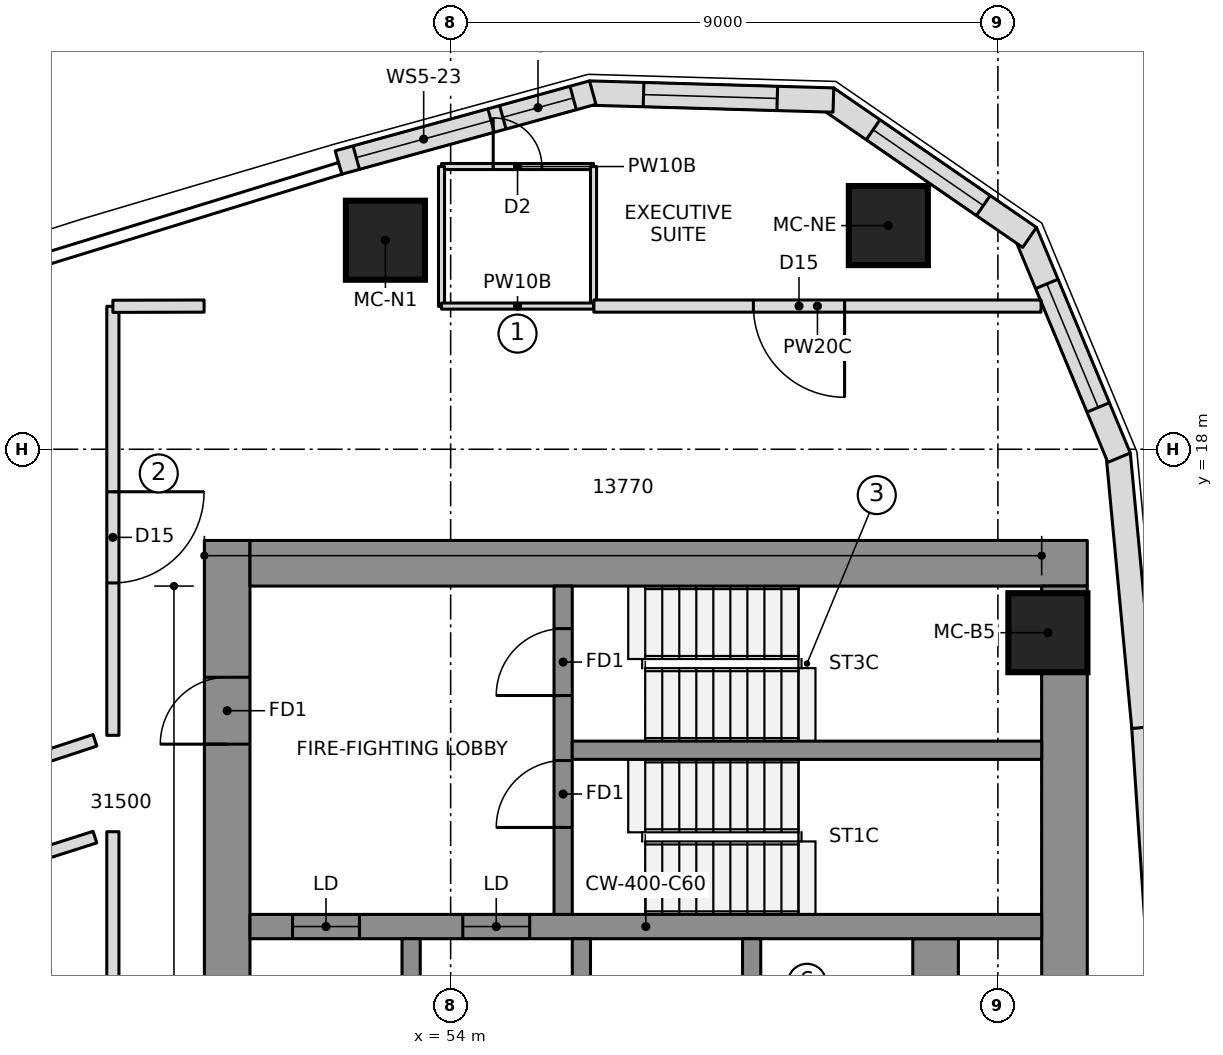
"""IFC4 building model, lengths in metres.
Left out: names, types, materials, properties, quantities, classifications, styles, units other than length and angle.
Written with IfcOpenShell. Run it as: python <this file> out.ifc"""

import sys

from ifc_helpers import new_model, si_unit, direction, frame, frame_2d, origin, origin_2d, place, context, subcontext, project, spatial, polyline, rectangle, outline, extrude, element, fill, save


model = new_model("IFC4")
c1 = context("Model", 3, precision=1e-05, world=origin(), true_north=direction((0.0, 1.0)))
c2 = subcontext(c1, "Body", "Model", "MODEL_VIEW")
j1 = project(units=[si_unit("LENGTHUNIT", "METRE"), si_unit("PLANEANGLEUNIT", "RADIAN")], contexts=[c1])
p1 = place(None, origin())
s1 = spatial("IfcSite", under=j1, at=p1, CompositionType="ELEMENT")
p2 = place(p1, origin())
s2 = spatial("IfcBuilding", under=s1, at=p2, CompositionType="ELEMENT")
p3 = place(p2, frame((0.0, 0.0, 186.15)))
s3 = spatial("IfcBuildingStorey", under=s2, at=p3, CompositionType="ELEMENT", Elevation=186.15)
p4 = place(p3, frame((50.325, 6.65, 0.0), z_axis=(0.0, 0.0, 1.0), x_axis=(0.0, 1.0, 0.0)))
e1 = element("IfcWall", 1, at=p4, inside=s3, PredefinedType="SHEAR", context=c2, shape_type="SweptSolid", body=[
    extrude(rectangle(XDim=9.85, YDim=0.75, at=frame_2d((4.925, 0.0))), origin(), (0.0, 0.0, 1.0), 3.55),
])
p5 = place(p4, frame((6.5, 0.0, 0.0)))
e2 = element("IfcOpeningElement", 2, at=p5, cuts=e1, PredefinedType="OPENING", context=c2, shape_type="SweptSolid", body=[
    extrude(rectangle(XDim=1.1, YDim=2.1, at=frame_2d((0.55, 1.05))), frame((0.0, 0.385, 0.0), z_axis=(0.0, -1.0, 0.0), x_axis=(1.0, 0.0, 0.0)), (0.0, 0.0, 1.0), 0.77),
])
p6 = place(p3, frame((50.7, 16.125, 0.0), z_axis=(0.0, 0.0, 1.0), x_axis=(1.0, 0.0, 0.0)))
e3 = element("IfcWall", 3, at=p6, inside=s3, PredefinedType="SHEAR", context=c2, shape_type="SweptSolid", body=[
    extrude(rectangle(XDim=13.77, YDim=0.75, at=frame_2d((6.885, 0.0))), origin(), (0.0, 0.0, 1.0), 3.55),
])
p7 = place(p3, frame((64.095, 8.099, 0.0), z_axis=(0.0, 0.0, 1.0), x_axis=(0.0, 1.0, 0.0)))
e4 = element("IfcWall", 4, at=p7, inside=s3, PredefinedType="SHEAR", context=c2, shape_type="SweptSolid", body=[
    extrude(rectangle(XDim=7.651, YDim=0.75, at=frame_2d((3.825, 0.0))), origin(), (0.0, 0.0, 1.0), 3.55),
])
p8 = place(p3, frame((61.975, -9.95, 0.0), z_axis=(0.0, 0.0, 1.0), x_axis=(0.0, 1.0, 0.0)))
e5 = element("IfcWall", 5, at=p8, inside=s3, PredefinedType="SHEAR", context=c2, shape_type="SweptSolid", body=[
    extrude(rectangle(XDim=19.9, YDim=0.75, at=frame_2d((9.95, 0.0))), origin(), (0.0, 0.0, 1.0), 3.55),
])
p9 = place(p3, frame((50.7, 10.15, 0.0), z_axis=(0.0, 0.0, 1.0), x_axis=(1.0, 0.0, 0.0)))
e6 = element("IfcWall", 6, at=p9, inside=s3, PredefinedType="SHEAR", context=c2, shape_type="SweptSolid", body=[
    extrude(rectangle(XDim=13.02, YDim=0.4, at=frame_2d((6.51, 0.0))), origin(), (0.0, 0.0, 1.0), 3.55),
])
p10 = place(p9, frame((0.7, 0.0, 0.0)))
e7 = element("IfcOpeningElement", 7, at=p10, cuts=e6, PredefinedType="OPENING", context=c2, shape_type="SweptSolid", body=[
    extrude(rectangle(XDim=1.1, YDim=2.1, at=frame_2d((0.55, 1.05))), frame((0.0, 0.21, 0.0), z_axis=(0.0, -1.0, 0.0), x_axis=(1.0, 0.0, 0.0)), (0.0, 0.0, 1.0), 0.42),
])
p11 = place(p9, frame((3.5, 0.0, 0.0)))
e8 = element("IfcOpeningElement", 8, at=p11, cuts=e6, PredefinedType="OPENING", context=c2, shape_type="SweptSolid", body=[
    extrude(rectangle(XDim=1.1, YDim=2.1, at=frame_2d((0.55, 1.05))), frame((0.0, 0.21, 0.0), z_axis=(0.0, -1.0, 0.0), x_axis=(1.0, 0.0, 0.0)), (0.0, 0.0, 1.0), 0.42),
])
for number, where, z_axis, x_axis in (
    (9, (53.35, 6.95, 0.0), (0.0, 0.0, 1.0), (0.0, 1.0, 0.0)),
    (10, (56.15, 6.95, 0.0), (0.0, 0.0, 1.0), (0.0, 1.0, 0.0)),
    (11, (58.95, 6.95, 0.0), (0.0, 0.0, 1.0), (0.0, 1.0, 0.0)),
):
    element("IfcWall", number, at=place(p3, frame(where, z_axis=z_axis, x_axis=x_axis)), inside=s3, PredefinedType="SHEAR", context=c2, shape_type="SweptSolid", body=[
        extrude(rectangle(XDim=3.0, YDim=0.3, at=frame_2d((1.5, 0.0))), origin(), (0.0, 0.0, 1.0), 3.55),
    ])
p12 = place(p3, frame((55.85, 10.35, 0.0), z_axis=(0.0, 0.0, 1.0), x_axis=(0.0, 1.0, 0.0)))
e12 = element("IfcWall", 12, at=p12, inside=s3, PredefinedType="SHEAR", context=c2, shape_type="SweptSolid", body=[
    extrude(rectangle(XDim=5.4, YDim=0.3, at=frame_2d((2.7, 0.0))), origin(), (0.0, 0.0, 1.0), 3.55),
])
p13 = place(p12, frame((1.43, 0.0, 0.0)))
e13 = element("IfcOpeningElement", 13, at=p13, cuts=e12, PredefinedType="OPENING", context=c2, shape_type="SweptSolid", body=[
    extrude(rectangle(XDim=1.1, YDim=2.1, at=frame_2d((0.55, 1.05))), frame((0.0, 0.16, 0.0), z_axis=(0.0, -1.0, 0.0), x_axis=(1.0, 0.0, 0.0)), (0.0, 0.0, 1.0), 0.32),
])
p14 = place(p12, frame((3.6, 0.0, 0.0)))
e14 = element("IfcOpeningElement", 14, at=p14, cuts=e12, PredefinedType="OPENING", context=c2, shape_type="SweptSolid", body=[
    extrude(rectangle(XDim=1.1, YDim=2.1, at=frame_2d((0.55, 1.05))), frame((0.0, 0.16, 0.0), z_axis=(0.0, -1.0, 0.0), x_axis=(1.0, 0.0, 0.0)), (0.0, 0.0, 1.0), 0.32),
])
p15 = place(p3, frame((56.0, 13.05, 0.0), z_axis=(0.0, 0.0, 1.0), x_axis=(1.0, 0.0, 0.0)))
e15 = element("IfcWall", 15, at=p15, inside=s3, PredefinedType="SHEAR", context=c2, shape_type="SweptSolid", body=[
    extrude(rectangle(XDim=7.72, YDim=0.3, at=frame_2d((3.86, 0.0))), origin(), (0.0, 0.0, 1.0), 3.55),
])
for number, where, z_axis, x_axis in (
    (16, (63.822, 14.983, 0.0), (0.0, 0.0, 1.0), (1.0, 0.0, 0.0)),
    (17, (61.198, 21.679, 0.0), (0.0, 0.0, 1.0), (1.0, 0.0, 0.0)),
    (18, (52.927, 21.438, 0.0), (0.0, 0.0, 1.0), (1.0, 0.0, 0.0)),
):
    element("IfcColumn", number, at=place(p3, frame(where, z_axis=z_axis, x_axis=x_axis)), inside=s3, PredefinedType="COLUMN", context=c2, shape_type="SweptSolid", body=[
        extrude(rectangle(XDim=1.3, YDim=1.3, at=origin_2d()), origin(), (0.0, 0.0, 1.0), 3.55),
    ])
p16 = place(p3, frame((65.7, 8.958, 0.0), z_axis=(0.0, 0.0, 1.0), x_axis=(-0.066905935948, 0.997759287471, 0.0)))
e19 = element("IfcWall", 19, at=p16, inside=s3, PredefinedType="NOTDEFINED", context=c2, shape_type="SweptSolid", body=[
    extrude(outline(polyline([(-0.003, -0.2), (4.484, -0.2), (4.478, 0.2), (0.003, 0.2), (-0.003, -0.2)])), origin(), (0.0, 0.0, 1.0), 3.25),
])
p17 = place(p3, frame((65.401, 13.429, 0.0), z_axis=(0.0, 0.0, 1.0), x_axis=(-0.093605694738, 0.995609348044, 0.0)))
e20 = element("IfcWall", 20, at=p17, inside=s3, PredefinedType="NOTDEFINED", context=c2, shape_type="SweptSolid", body=[
    extrude(outline(polyline([(-0.003, -0.2), (4.511, -0.2), (4.451, 0.2), (0.003, 0.2), (-0.003, -0.2)])), origin(), (0.0, 0.0, 1.0), 3.25),
])
p18 = place(p3, frame((64.981, 17.89, 0.0), z_axis=(0.0, 0.0, 1.0), x_axis=(-0.383997619794, 0.923334082547, 0.0)))
e21 = element("IfcWall", 21, at=p18, inside=s3, PredefinedType="NOTDEFINED", context=c2, shape_type="SweptSolid", body=[
    extrude(outline(polyline([(-0.03, -0.2), (3.988, -0.2), (3.87, 0.2), (0.03, 0.2), (-0.03, -0.2)])), origin(), (0.0, 0.0, 1.0), 3.25),
])
p19 = place(p18, frame((0.865, 0.0, 0.6)))
e22 = element("IfcOpeningElement", 22, at=p19, cuts=e21, PredefinedType="OPENING", context=c2, shape_type="SweptSolid", body=[
    extrude(outline(polyline([(0.0, 1.35), (0.084, 1.771), (0.322, 2.128), (0.679, 2.366), (1.1, 2.45), (1.521, 2.366), (1.878, 2.128), (2.116, 1.771), (2.2, 1.35), (2.2, 1.1), (2.116, 0.679), (1.878, 0.322), (1.521, 0.084), (1.1, 0.0), (0.679, 0.084), (0.322, 0.322), (0.084, 0.679), (0.0, 1.1), (0.0, 1.35)])), frame((0.0, 0.21, 0.0), z_axis=(0.0, -1.0, 0.0), x_axis=(1.0, 0.0, 0.0)), (0.0, 0.0, 1.0), 0.42),
])
p20 = place(p3, frame((63.472, 21.518, 0.0), z_axis=(0.0, 0.0, 1.0), x_axis=(-0.823806162588, 0.566871596115, 0.0)))
e23 = element("IfcWall", 23, at=p20, inside=s3, PredefinedType="NOTDEFINED", context=c2, shape_type="SweptSolid", body=[
    extrude(outline(polyline([(-0.059, -0.2), (3.988, -0.2), (3.87, 0.2), (0.059, 0.2), (-0.059, -0.2)])), origin(), (0.0, 0.0, 1.0), 3.25),
])
p21 = place(p20, frame((0.865, 0.0, 0.6)))
e24 = element("IfcOpeningElement", 24, at=p21, cuts=e23, PredefinedType="OPENING", context=c2, shape_type="SweptSolid", body=[
    extrude(outline(polyline([(0.0, 1.35), (0.084, 1.771), (0.322, 2.128), (0.679, 2.366), (1.1, 2.45), (1.521, 2.366), (1.878, 2.128), (2.116, 1.771), (2.2, 1.35), (2.2, 1.1), (2.116, 0.679), (1.878, 0.322), (1.521, 0.084), (1.1, 0.0), (0.679, 0.084), (0.322, 0.322), (0.084, 0.679), (0.0, 1.1), (0.0, 1.35)])), frame((0.0, 0.21, 0.0), z_axis=(0.0, -1.0, 0.0), x_axis=(1.0, 0.0, 0.0)), (0.0, 0.0, 1.0), 0.42),
])
p22 = place(p3, frame((60.236, 23.745, 0.0), z_axis=(0.0, 0.0, 1.0), x_axis=(-0.999587920197, 0.028705222472, 0.0)))
e25 = element("IfcWall", 25, at=p22, inside=s3, PredefinedType="NOTDEFINED", context=c2, shape_type="SweptSolid", body=[
    extrude(outline(polyline([(-0.059, -0.2), (3.959, -0.2), (3.9, 0.2), (0.059, 0.2), (-0.059, -0.2)])), origin(), (0.0, 0.0, 1.0), 3.25),
])
p23 = place(p22, frame((0.865, 0.0, 0.6)))
e26 = element("IfcOpeningElement", 26, at=p23, cuts=e25, PredefinedType="OPENING", context=c2, shape_type="SweptSolid", body=[
    extrude(outline(polyline([(0.0, 1.35), (0.084, 1.771), (0.322, 2.128), (0.679, 2.366), (1.1, 2.45), (1.521, 2.366), (1.878, 2.128), (2.116, 1.771), (2.2, 1.35), (2.2, 1.1), (2.116, 0.679), (1.878, 0.322), (1.521, 0.084), (1.1, 0.0), (0.679, 0.084), (0.322, 0.322), (0.084, 0.679), (0.0, 1.1), (0.0, 1.35)])), frame((0.0, 0.21, 0.0), z_axis=(0.0, -1.0, 0.0), x_axis=(1.0, 0.0, 0.0)), (0.0, 0.0, 1.0), 0.42),
])
p24 = place(p3, frame((56.308, 23.858, 0.0), z_axis=(0.0, 0.0, 1.0), x_axis=(-0.964205755089, -0.265155165617, 0.0)))
e27 = element("IfcWall", 27, at=p24, inside=s3, PredefinedType="NOTDEFINED", context=c2, shape_type="SweptSolid", body=[
    extrude(outline(polyline([(-0.03, -0.2), (4.307, -0.2), (4.307, 0.2), (0.03, 0.2), (-0.03, -0.2)])), origin(), (0.0, 0.0, 1.0), 3.25),
])
p25 = place(p24, frame((0.303, 0.0, 0.9)))
e28 = element("IfcOpeningElement", 28, at=p25, cuts=e27, PredefinedType="OPENING", context=c2, shape_type="SweptSolid", body=[
    extrude(rectangle(XDim=1.2, YDim=1.8, at=frame_2d((0.6, 0.9))), frame((0.0, 0.21, 0.0), z_axis=(0.0, -1.0, 0.0), x_axis=(1.0, 0.0, 0.0)), (0.0, 0.0, 1.0), 0.42),
])
p26 = place(p24, frame((1.704, 0.0, 0.9)))
e29 = element("IfcOpeningElement", 29, at=p26, cuts=e27, PredefinedType="OPENING", context=c2, shape_type="SweptSolid", body=[
    extrude(rectangle(XDim=2.3, YDim=1.8, at=frame_2d((1.15, 0.9))), frame((0.0, 0.21, 0.0), z_axis=(0.0, -1.0, 0.0), x_axis=(1.0, 0.0, 0.0)), (0.0, 0.0, 1.0), 0.42),
])
p27 = place(p3, frame((53.85, 22.65, 0.0), z_axis=(0.0, 0.0, 1.0), x_axis=(1.0, 0.0, 0.0)))
e30 = element("IfcWall", 30, at=p27, inside=s3, PredefinedType="PARTITIONING", context=c2, shape_type="SweptSolid", body=[
    extrude(rectangle(XDim=2.5, YDim=0.1, at=frame_2d((1.25, 0.0))), origin(), (0.0, 0.0, 1.0), 3.25),
])
p28 = place(p27, frame((0.85, 0.0, 0.0)))
e31 = element("IfcOpeningElement", 31, at=p28, cuts=e30, PredefinedType="OPENING", context=c2, shape_type="SweptSolid", body=[
    extrude(rectangle(XDim=0.8, YDim=2.1, at=frame_2d((0.4, 1.05))), frame((0.0, 0.06, 0.0), z_axis=(0.0, -1.0, 0.0), x_axis=(1.0, 0.0, 0.0)), (0.0, 0.0, 1.0), 0.12),
])
for number, where, z_axis, x_axis in (
    (32, (56.35, 22.65, 0.0), (0.0, 0.0, 1.0), (0.0, -1.0, 0.0)),
    (33, (53.85, 20.35, 0.0), (0.0, 0.0, 1.0), (0.0, 1.0, 0.0)),
):
    element("IfcWall", number, at=place(p3, frame(where, z_axis=z_axis, x_axis=x_axis)), inside=s3, PredefinedType="PARTITIONING", context=c2, shape_type="SweptSolid", body=[
        extrude(rectangle(XDim=2.3, YDim=0.1, at=frame_2d((1.15, 0.0))), origin(), (0.0, 0.0, 1.0), 3.25),
    ])
p29 = place(p3, frame((63.709, 20.355, 0.0), z_axis=(0.0, 0.0, 1.0), x_axis=(-1.0, 0.0, 0.0)))
e34 = element("IfcWall", 34, at=p29, inside=s3, PredefinedType="PARTITIONING", context=c2, shape_type="SweptSolid", body=[
    extrude(rectangle(XDim=7.354, YDim=0.2, at=frame_2d((3.677, 0.0))), origin(), (0.0, 0.0, 1.0), 3.25),
])
p30 = place(p29, frame((3.231, 0.0, 0.0)))
e35 = element("IfcOpeningElement", 35, at=p30, cuts=e34, PredefinedType="OPENING", context=c2, shape_type="SweptSolid", body=[
    extrude(rectangle(XDim=1.5, YDim=2.1, at=frame_2d((0.75, 1.05))), frame((0.0, 0.11, 0.0), z_axis=(0.0, -1.0, 0.0), x_axis=(1.0, 0.0, 0.0)), (0.0, 0.0, 1.0), 0.22),
])
p31 = place(p3, frame((56.35, 20.355, 0.0), z_axis=(0.0, 0.0, 1.0), x_axis=(-1.0, 0.0, 0.0)))
e36 = element("IfcWall", 36, at=p31, inside=s3, PredefinedType="PARTITIONING", context=c2, shape_type="SweptSolid", body=[
    extrude(rectangle(XDim=2.5, YDim=0.1, at=frame_2d((1.25, 0.0))), origin(), (0.0, 0.0, 1.0), 3.25),
])
p32 = place(p3, frame((48.15, 13.213, 0.0), z_axis=(0.0, 0.0, 1.0), x_axis=(-0.949729856115, -0.313070599711, 0.0)))
e37 = element("IfcWall", 37, at=p32, inside=s3, PredefinedType="PARTITIONING", context=c2, shape_type="SweptSolid", body=[
    extrude(rectangle(XDim=3.853, YDim=0.2, at=frame_2d((1.927, 0.0))), origin(), (0.0, 0.0, 1.0), 3.25),
])
p33 = place(p3, frame((46.881, 11.217, 0.0), z_axis=(0.0, 0.0, 1.0), x_axis=(0.952761948983, 0.303718074157, 0.0)))
e38 = element("IfcWall", 38, at=p33, inside=s3, PredefinedType="PARTITIONING", context=c2, shape_type="SweptSolid", body=[
    extrude(rectangle(XDim=1.332, YDim=0.2, at=frame_2d((0.666, 0.0))), origin(), (0.0, 0.0, 1.0), 3.25),
])
p34 = place(p3, frame((48.445, 11.71, 0.0), z_axis=(0.0, 0.0, 1.0), x_axis=(0.0, -1.0, 0.0)))
e39 = element("IfcWall", 39, at=p34, inside=s3, PredefinedType="PARTITIONING", context=c2, shape_type="SweptSolid", body=[
    extrude(rectangle(XDim=23.42, YDim=0.2, at=frame_2d((11.71, 0.0))), origin(), (0.0, 0.0, 1.0), 3.25),
])
p35 = place(p3, frame((48.445, 20.351, 0.0), z_axis=(0.0, 0.0, 1.0), x_axis=(0.0, -1.0, 0.0)))
e40 = element("IfcWall", 40, at=p35, inside=s3, PredefinedType="PARTITIONING", context=c2, shape_type="SweptSolid", body=[
    extrude(rectangle(XDim=7.056, YDim=0.2, at=frame_2d((3.528, 0.0))), origin(), (0.0, 0.0, 1.0), 3.25),
])
p36 = place(p35, frame((3.05, 0.0, 0.0)))
e41 = element("IfcOpeningElement", 41, at=p36, cuts=e40, PredefinedType="OPENING", context=c2, shape_type="SweptSolid", body=[
    extrude(rectangle(XDim=1.5, YDim=2.1, at=frame_2d((0.75, 1.05))), frame((0.0, 0.11, 0.0), z_axis=(0.0, -1.0, 0.0), x_axis=(1.0, 0.0, 0.0)), (0.0, 0.0, 1.0), 0.22),
])
p37 = place(p3, frame((49.945, 20.355, 0.0), z_axis=(0.0, 0.0, 1.0), x_axis=(-0.999996609175, -0.002604157836, 0.0)))
e42 = element("IfcWall", 42, at=p37, inside=s3, PredefinedType="PARTITIONING", context=c2, shape_type="SweptSolid", body=[
    extrude(rectangle(XDim=1.5, YDim=0.2, at=frame_2d((0.75, 0.0))), origin(), (0.0, 0.0, 1.0), 3.25),
])
p38 = place(p19, origin())
e43 = element("IfcWindow", 43, at=p38, inside=s3, PartitioningType="SINGLE_PANEL", PredefinedType="WINDOW", context=c2, shape_type="SweptSolid", body=[
    extrude(outline(polyline([(0.0, 1.35), (0.084, 1.771), (0.322, 2.128), (0.679, 2.366), (1.1, 2.45), (1.521, 2.366), (1.878, 2.128), (2.116, 1.771), (2.2, 1.35), (2.2, 1.1), (2.116, 0.679), (1.878, 0.322), (1.521, 0.084), (1.1, 0.0), (0.679, 0.084), (0.322, 0.322), (0.084, 0.679), (0.0, 1.1), (0.0, 1.35)])), frame((0.0, 0.17, 0.0), z_axis=(0.0, -1.0, 0.0), x_axis=(1.0, 0.0, 0.0)), (0.0, 0.0, 1.0), 0.06),
])
fill(e22, e43)
p39 = place(p21, origin())
e44 = element("IfcWindow", 44, at=p39, inside=s3, PartitioningType="SINGLE_PANEL", PredefinedType="WINDOW", context=c2, shape_type="SweptSolid", body=[
    extrude(outline(polyline([(0.0, 1.35), (0.084, 1.771), (0.322, 2.128), (0.679, 2.366), (1.1, 2.45), (1.521, 2.366), (1.878, 2.128), (2.116, 1.771), (2.2, 1.35), (2.2, 1.1), (2.116, 0.679), (1.878, 0.322), (1.521, 0.084), (1.1, 0.0), (0.679, 0.084), (0.322, 0.322), (0.084, 0.679), (0.0, 1.1), (0.0, 1.35)])), frame((0.0, 0.17, 0.0), z_axis=(0.0, -1.0, 0.0), x_axis=(1.0, 0.0, 0.0)), (0.0, 0.0, 1.0), 0.06),
])
fill(e24, e44)
p40 = place(p23, origin())
e45 = element("IfcWindow", 45, at=p40, inside=s3, PartitioningType="SINGLE_PANEL", PredefinedType="WINDOW", context=c2, shape_type="SweptSolid", body=[
    extrude(outline(polyline([(0.0, 1.35), (0.084, 1.771), (0.322, 2.128), (0.679, 2.366), (1.1, 2.45), (1.521, 2.366), (1.878, 2.128), (2.116, 1.771), (2.2, 1.35), (2.2, 1.1), (2.116, 0.679), (1.878, 0.322), (1.521, 0.084), (1.1, 0.0), (0.679, 0.084), (0.322, 0.322), (0.084, 0.679), (0.0, 1.1), (0.0, 1.35)])), frame((0.0, 0.17, 0.0), z_axis=(0.0, -1.0, 0.0), x_axis=(1.0, 0.0, 0.0)), (0.0, 0.0, 1.0), 0.06),
])
fill(e26, e45)
p41 = place(p25, origin())
e46 = element("IfcWindow", 46, at=p41, inside=s3, PartitioningType="SINGLE_PANEL", PredefinedType="WINDOW", context=c2, shape_type="SweptSolid", body=[
    extrude(rectangle(XDim=1.2, YDim=1.8, at=frame_2d((0.6, 0.9))), frame((0.0, 0.17, 0.0), z_axis=(0.0, -1.0, 0.0), x_axis=(1.0, 0.0, 0.0)), (0.0, 0.0, 1.0), 0.06),
])
fill(e28, e46)
p42 = place(p26, origin())
e47 = element("IfcWindow", 47, at=p42, inside=s3, PartitioningType="SINGLE_PANEL", PredefinedType="WINDOW", context=c2, shape_type="SweptSolid", body=[
    extrude(rectangle(XDim=2.3, YDim=1.8, at=frame_2d((1.15, 0.9))), frame((0.0, 0.17, 0.0), z_axis=(0.0, -1.0, 0.0), x_axis=(1.0, 0.0, 0.0)), (0.0, 0.0, 1.0), 0.06),
])
fill(e29, e47)
p43 = place(p28, origin())
e48 = element("IfcDoor", 48, at=p43, inside=s3, OperationType="SINGLE_SWING_LEFT", PredefinedType="DOOR", context=c2, shape_type="SweptSolid", body=[
    extrude(rectangle(XDim=0.8, YDim=2.1, at=frame_2d((0.4, 1.05))), frame((0.0, 0.025, 0.0), z_axis=(0.0, -1.0, 0.0), x_axis=(1.0, 0.0, 0.0)), (0.0, 0.0, 1.0), 0.05),
])
fill(e31, e48)
p44 = place(p30, origin())
e49 = element("IfcDoor", 49, at=p44, inside=s3, OperationType="DOUBLE_DOOR_SINGLE_SWING", PredefinedType="DOOR", context=c2, shape_type="SweptSolid", body=[
    extrude(rectangle(XDim=1.5, YDim=2.1, at=frame_2d((0.75, 1.05))), frame((0.0, 0.025, 0.0), z_axis=(0.0, -1.0, 0.0), x_axis=(1.0, 0.0, 0.0)), (0.0, 0.0, 1.0), 0.05),
])
fill(e35, e49)
p45 = place(p36, origin())
e50 = element("IfcDoor", 50, at=p45, inside=s3, OperationType="DOUBLE_DOOR_SINGLE_SWING", PredefinedType="DOOR", context=c2, shape_type="SweptSolid", body=[
    extrude(rectangle(XDim=1.5, YDim=2.1, at=frame_2d((0.75, 1.05))), frame((0.0, 0.025, 0.0), z_axis=(0.0, -1.0, 0.0), x_axis=(1.0, 0.0, 0.0)), (0.0, 0.0, 1.0), 0.05),
])
fill(e41, e50)
p46 = place(p10, origin())
e51 = element("IfcDoor", 51, at=p46, inside=s3, OperationType="DOUBLE_DOOR_SLIDING", PredefinedType="DOOR", context=c2, shape_type="SweptSolid", body=[
    extrude(rectangle(XDim=1.1, YDim=2.1, at=frame_2d((0.55, 1.05))), frame((0.0, 0.025, 0.0), z_axis=(0.0, -1.0, 0.0), x_axis=(1.0, 0.0, 0.0)), (0.0, 0.0, 1.0), 0.05),
])
fill(e7, e51)
p47 = place(p11, origin())
e52 = element("IfcDoor", 52, at=p47, inside=s3, OperationType="DOUBLE_DOOR_SLIDING", PredefinedType="DOOR", context=c2, shape_type="SweptSolid", body=[
    extrude(rectangle(XDim=1.1, YDim=2.1, at=frame_2d((0.55, 1.05))), frame((0.0, 0.025, 0.0), z_axis=(0.0, -1.0, 0.0), x_axis=(1.0, 0.0, 0.0)), (0.0, 0.0, 1.0), 0.05),
])
fill(e8, e52)
p48 = place(p13, origin())
e53 = element("IfcDoor", 53, at=p48, inside=s3, OperationType="SINGLE_SWING_RIGHT", PredefinedType="DOOR", context=c2, shape_type="SweptSolid", body=[
    extrude(rectangle(XDim=1.1, YDim=2.1, at=frame_2d((0.55, 1.05))), frame((0.0, 0.025, 0.0), z_axis=(0.0, -1.0, 0.0), x_axis=(1.0, 0.0, 0.0)), (0.0, 0.0, 1.0), 0.05),
])
fill(e13, e53)
p49 = place(p14, origin())
e54 = element("IfcDoor", 54, at=p49, inside=s3, OperationType="SINGLE_SWING_RIGHT", PredefinedType="DOOR", context=c2, shape_type="SweptSolid", body=[
    extrude(rectangle(XDim=1.1, YDim=2.1, at=frame_2d((0.55, 1.05))), frame((0.0, 0.025, 0.0), z_axis=(0.0, -1.0, 0.0), x_axis=(1.0, 0.0, 0.0)), (0.0, 0.0, 1.0), 0.05),
])
fill(e14, e54)
p50 = place(p5, origin())
e55 = element("IfcDoor", 55, at=p50, inside=s3, OperationType="SINGLE_SWING_RIGHT", PredefinedType="DOOR", context=c2, shape_type="SweptSolid", body=[
    extrude(rectangle(XDim=1.1, YDim=2.1, at=frame_2d((0.55, 1.05))), frame((0.0, 0.025, 0.0), z_axis=(0.0, -1.0, 0.0), x_axis=(1.0, 0.0, 0.0)), (0.0, 0.0, 1.0), 0.05),
])
fill(e2, e55)
save(model, sys.argv[1])
